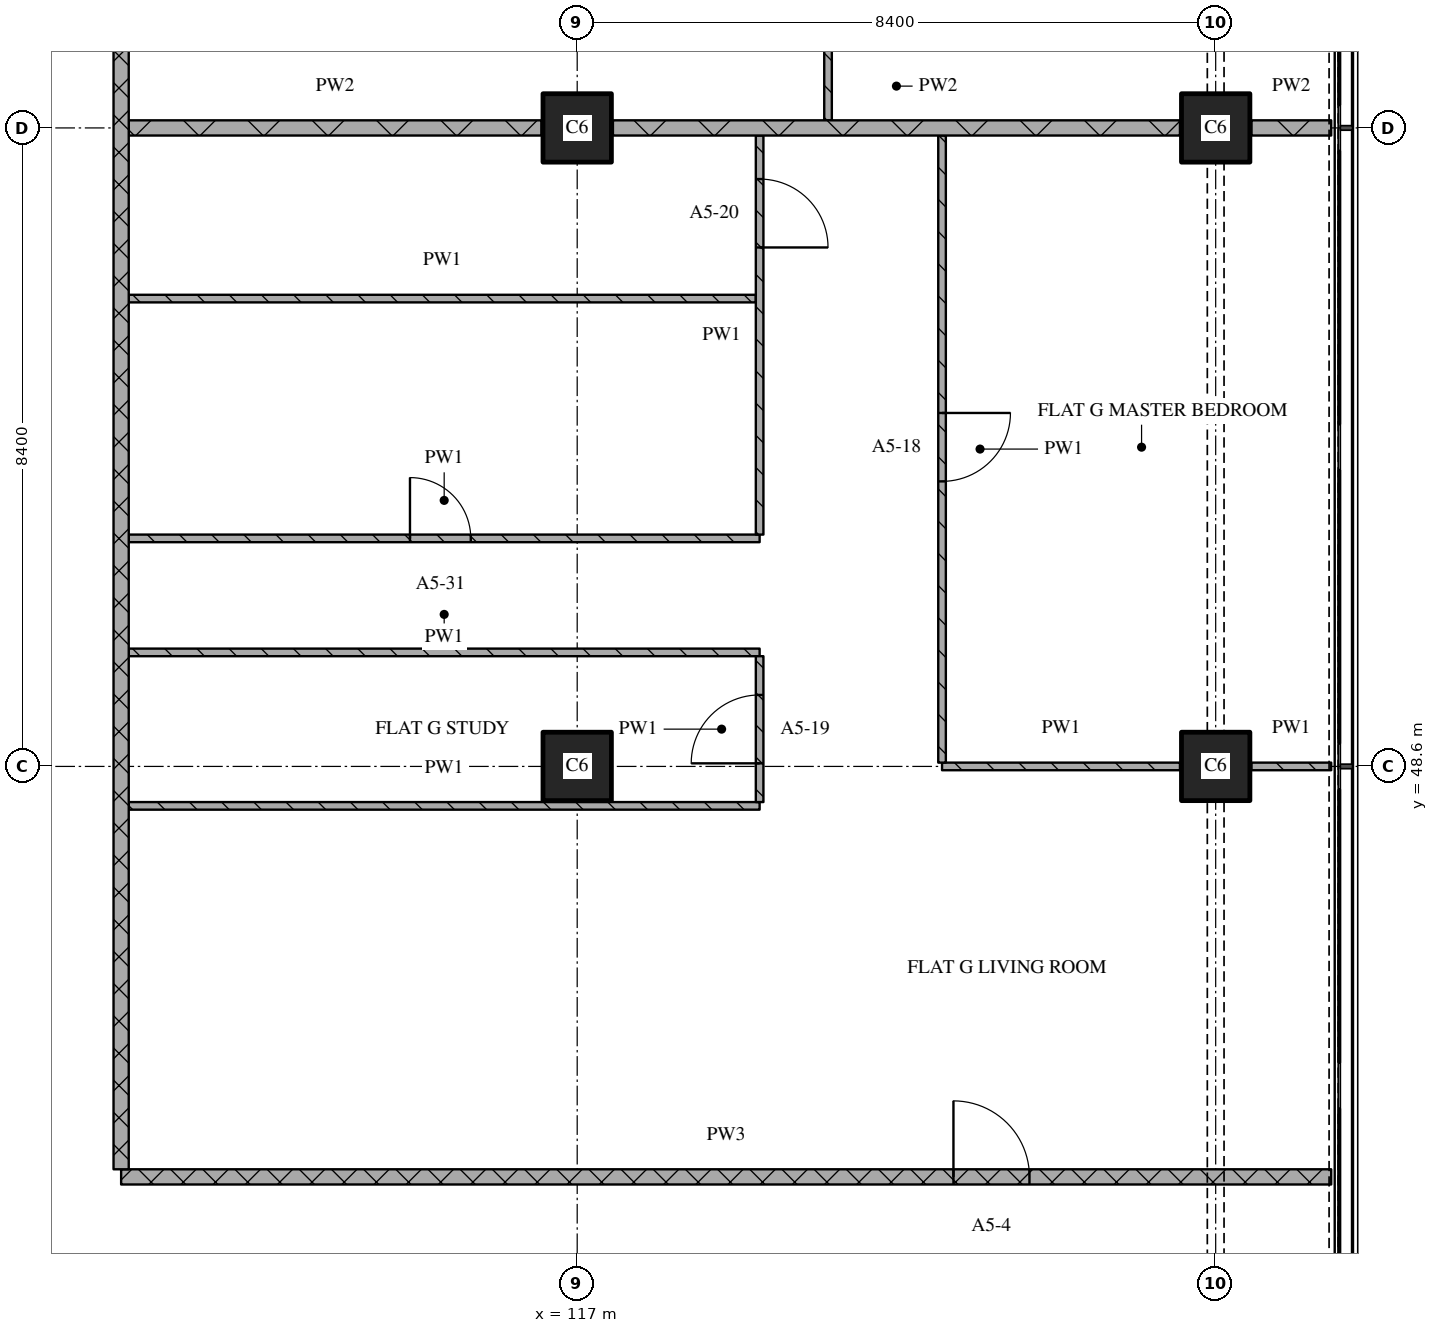
"""IFC4 building model, lengths in metres.
Left out: names, types, materials, properties, quantities, classifications, styles, units other than length and angle.
Written with IfcOpenShell. Run it as: python <this file> out.ifc"""

import sys

from ifc_helpers import new_model, si_unit, direction, frame, frame_2d, origin, origin_2d, place, context, subcontext, project, spatial, rectangle, extrude, element, fill, save


model = new_model("IFC4")
c1 = context("Model", 3, precision=1e-05, world=origin(), true_north=direction((0.0, 1.0)))
c2 = subcontext(c1, "Body", "Model", "MODEL_VIEW")
j1 = project(units=[si_unit("LENGTHUNIT", "METRE"), si_unit("PLANEANGLEUNIT", "RADIAN")], contexts=[c1])
p1 = place(None, origin())
s1 = spatial("IfcSite", under=j1, at=p1, CompositionType="ELEMENT")
p2 = place(p1, origin())
s2 = spatial("IfcBuilding", under=s1, at=p2, CompositionType="ELEMENT")
p3 = place(p2, frame((0.0, 0.0, 80.4)))
s3 = spatial("IfcBuildingStorey", under=s2, at=p3, CompositionType="ELEMENT", Elevation=80.4)
for number, where, z_axis, x_axis in (
    (1, (117.0, 48.6, 0.0), (0.0, 0.0, 1.0), (1.0, 0.0, 0.0)),
    (2, (117.0, 57.0, 0.0), (0.0, 0.0, 1.0), (1.0, 0.0, 0.0)),
    (3, (125.4, 48.6, 0.0), (0.0, 0.0, 1.0), (1.0, 0.0, 0.0)),
    (4, (125.4, 57.0, 0.0), (0.0, 0.0, 1.0), (1.0, 0.0, 0.0)),
):
    element("IfcColumn", number, at=place(p3, frame(where, z_axis=z_axis, x_axis=x_axis)), inside=s3, PredefinedType="COLUMN", context=c2, shape_type="SweptSolid", body=[
        extrude(rectangle(XDim=0.9, YDim=0.9, at=origin_2d()), origin(), (0.0, 0.0, 1.0), 3.6),
    ])
p4 = place(p3, frame((111.0, 43.2, 0.0), z_axis=(0.0, 0.0, 1.0), x_axis=(1.0, 0.0, 0.0)))
e5 = element("IfcWall", 5, at=p4, inside=s3, PredefinedType="PARTITIONING", context=c2, shape_type="SweptSolid", body=[
    extrude(rectangle(XDim=15.92, YDim=0.2, at=frame_2d((7.96, 0.0))), origin(), (0.0, 0.0, 1.0), 3.3),
])
p5 = place(p4, frame((10.95, 0.0, 0.0)))
e6 = element("IfcOpeningElement", 6, at=p5, cuts=e5, PredefinedType="OPENING", context=c2, shape_type="SweptSolid", body=[
    extrude(rectangle(XDim=1.0, YDim=2.1, at=frame_2d((0.5, 1.05))), frame((0.0, 0.11, 0.0), z_axis=(0.0, -1.0, 0.0), x_axis=(1.0, 0.0, 0.0)), (0.0, 0.0, 1.0), 0.22),
])
p6 = place(p3, frame((111.1, 48.081, 0.0), z_axis=(0.0, 0.0, 1.0), x_axis=(1.0, 0.0, 0.0)))
e7 = element("IfcWall", 7, at=p6, inside=s3, PredefinedType="PARTITIONING", context=c2, shape_type="SweptSolid", body=[
    extrude(rectangle(XDim=8.3, YDim=0.1, at=frame_2d((4.15, 0.0))), origin(), (0.0, 0.0, 1.0), 3.3),
])
p7 = place(p3, frame((121.8, 48.6, 0.0), z_axis=(0.0, 0.0, 1.0), x_axis=(1.0, 0.0, 0.0)))
e8 = element("IfcWall", 8, at=p7, inside=s3, PredefinedType="PARTITIONING", context=c2, shape_type="SweptSolid", body=[
    extrude(rectangle(XDim=3.13, YDim=0.1, at=frame_2d((1.565, 0.0))), origin(), (0.0, 0.0, 1.0), 3.3),
])
p8 = place(p3, frame((125.87, 48.6, 0.0), z_axis=(0.0, 0.0, 1.0), x_axis=(1.0, 0.0, 0.0)))
e9 = element("IfcWall", 9, at=p8, inside=s3, PredefinedType="PARTITIONING", context=c2, shape_type="SweptSolid", body=[
    extrude(rectangle(XDim=1.05, YDim=0.1, at=frame_2d((0.525, 0.0))), origin(), (0.0, 0.0, 1.0), 3.3),
])
p9 = place(p3, frame((111.1, 50.1, 0.0), z_axis=(0.0, 0.0, 1.0), x_axis=(1.0, 0.0, 0.0)))
e10 = element("IfcWall", 10, at=p9, inside=s3, PredefinedType="PARTITIONING", context=c2, shape_type="SweptSolid", body=[
    extrude(rectangle(XDim=8.3, YDim=0.1, at=frame_2d((4.15, 0.0))), origin(), (0.0, 0.0, 1.0), 3.3),
])
p10 = place(p3, frame((111.1, 51.6, 0.0), z_axis=(0.0, 0.0, 1.0), x_axis=(1.0, 0.0, 0.0)))
e11 = element("IfcWall", 11, at=p10, inside=s3, PredefinedType="PARTITIONING", context=c2, shape_type="SweptSolid", body=[
    extrude(rectangle(XDim=8.3, YDim=0.1, at=frame_2d((4.15, 0.0))), origin(), (0.0, 0.0, 1.0), 3.3),
])
p11 = place(p10, frame((3.7, 0.0, 0.0)))
e12 = element("IfcOpeningElement", 12, at=p11, cuts=e11, PredefinedType="OPENING", context=c2, shape_type="SweptSolid", body=[
    extrude(rectangle(XDim=0.8, YDim=2.1, at=frame_2d((0.4, 1.05))), frame((0.0, 0.06, 0.0), z_axis=(0.0, -1.0, 0.0), x_axis=(1.0, 0.0, 0.0)), (0.0, 0.0, 1.0), 0.12),
])
p12 = place(p3, frame((111.1, 54.755, 0.0), z_axis=(0.0, 0.0, 1.0), x_axis=(1.0, 0.0, 0.0)))
e13 = element("IfcWall", 13, at=p12, inside=s3, PredefinedType="PARTITIONING", context=c2, shape_type="SweptSolid", body=[
    extrude(rectangle(XDim=8.25, YDim=0.1, at=frame_2d((4.125, 0.0))), origin(), (0.0, 0.0, 1.0), 3.3),
])
p13 = place(p3, frame((111.1, 57.0, 0.0), z_axis=(0.0, 0.0, 1.0), x_axis=(1.0, 0.0, 0.0)))
e14 = element("IfcWall", 14, at=p13, inside=s3, PredefinedType="PARTITIONING", context=c2, shape_type="SweptSolid", body=[
    extrude(rectangle(XDim=5.43, YDim=0.2, at=frame_2d((2.715, 0.0))), origin(), (0.0, 0.0, 1.0), 3.3),
])
p14 = place(p3, frame((117.47, 57.0, 0.0), z_axis=(0.0, 0.0, 1.0), x_axis=(1.0, 0.0, 0.0)))
e15 = element("IfcWall", 15, at=p14, inside=s3, PredefinedType="PARTITIONING", context=c2, shape_type="SweptSolid", body=[
    extrude(rectangle(XDim=7.46, YDim=0.2, at=frame_2d((3.73, 0.0))), origin(), (0.0, 0.0, 1.0), 3.3),
])
p15 = place(p3, frame((125.87, 57.0, 0.0), z_axis=(0.0, 0.0, 1.0), x_axis=(1.0, 0.0, 0.0)))
e16 = element("IfcWall", 16, at=p15, inside=s3, PredefinedType="PARTITIONING", context=c2, shape_type="SweptSolid", body=[
    extrude(rectangle(XDim=1.05, YDim=0.2, at=frame_2d((0.525, 0.0))), origin(), (0.0, 0.0, 1.0), 3.3),
])
p16 = place(p3, frame((111.0, 75.32, 0.0), z_axis=(0.0, 0.0, 1.0), x_axis=(0.0, -1.0, 0.0)))
e17 = element("IfcWall", 17, at=p16, inside=s3, PredefinedType="PARTITIONING", context=c2, shape_type="SweptSolid", body=[
    extrude(rectangle(XDim=32.02, YDim=0.2, at=frame_2d((16.01, 0.0))), origin(), (0.0, 0.0, 1.0), 3.3),
])
p17 = place(p16, frame((11.37, 0.0, 0.0)))
e18 = element("IfcOpeningElement", 18, at=p17, cuts=e17, PredefinedType="OPENING", context=c2, shape_type="SweptSolid", body=[
    extrude(rectangle(XDim=1.0, YDim=2.1, at=frame_2d((0.5, 1.05))), frame((0.0, 0.11, 0.0), z_axis=(0.0, -1.0, 0.0), x_axis=(1.0, 0.0, 0.0)), (0.0, 0.0, 1.0), 0.22),
])
p18 = place(p3, frame((119.4, 48.131, 0.0), z_axis=(0.0, 0.0, 1.0), x_axis=(0.0, 1.0, 0.0)))
e19 = element("IfcWall", 19, at=p18, inside=s3, PredefinedType="PARTITIONING", context=c2, shape_type="SweptSolid", body=[
    extrude(rectangle(XDim=1.919, YDim=0.1, at=frame_2d((0.959, 0.0))), origin(), (0.0, 0.0, 1.0), 3.3),
])
p19 = place(p18, frame((0.51, 0.0, 0.0)))
e20 = element("IfcOpeningElement", 20, at=p19, cuts=e19, PredefinedType="OPENING", context=c2, shape_type="SweptSolid", body=[
    extrude(rectangle(XDim=0.9, YDim=2.1, at=frame_2d((0.45, 1.05))), frame((0.0, 0.06, 0.0), z_axis=(0.0, -1.0, 0.0), x_axis=(1.0, 0.0, 0.0)), (0.0, 0.0, 1.0), 0.12),
])
p20 = place(p3, frame((119.4, 51.65, 0.0), z_axis=(0.0, 0.0, 1.0), x_axis=(0.0, 1.0, 0.0)))
e21 = element("IfcWall", 21, at=p20, inside=s3, PredefinedType="PARTITIONING", context=c2, shape_type="SweptSolid", body=[
    extrude(rectangle(XDim=5.25, YDim=0.1, at=frame_2d((2.625, 0.0))), origin(), (0.0, 0.0, 1.0), 3.3),
])
p21 = place(p20, frame((3.777, 0.0, 0.0)))
e22 = element("IfcOpeningElement", 22, at=p21, cuts=e21, PredefinedType="OPENING", context=c2, shape_type="SweptSolid", body=[
    extrude(rectangle(XDim=0.9, YDim=2.1, at=frame_2d((0.45, 1.05))), frame((0.0, 0.06, 0.0), z_axis=(0.0, -1.0, 0.0), x_axis=(1.0, 0.0, 0.0)), (0.0, 0.0, 1.0), 0.12),
])
p22 = place(p3, frame((120.3, 57.1, 0.0), z_axis=(0.0, 0.0, 1.0), x_axis=(0.0, 1.0, 0.0)))
e23 = element("IfcWall", 23, at=p22, inside=s3, PredefinedType="PARTITIONING", context=c2, shape_type="SweptSolid", body=[
    extrude(rectangle(XDim=5.55, YDim=0.1, at=frame_2d((2.775, 0.0))), origin(), (0.0, 0.0, 1.0), 3.3),
])
p23 = place(p22, frame((0.925, 0.0, 0.0)))
e24 = element("IfcOpeningElement", 24, at=p23, cuts=e23, PredefinedType="OPENING", context=c2, shape_type="SweptSolid", body=[
    extrude(rectangle(XDim=0.8, YDim=2.1, at=frame_2d((0.4, 1.05))), frame((0.0, 0.06, 0.0), z_axis=(0.0, -1.0, 0.0), x_axis=(1.0, 0.0, 0.0)), (0.0, 0.0, 1.0), 0.12),
])
p24 = place(p22, frame((3.775, 0.0, 0.0)))
e25 = element("IfcOpeningElement", 25, at=p24, cuts=e23, PredefinedType="OPENING", context=c2, shape_type="SweptSolid", body=[
    extrude(rectangle(XDim=0.8, YDim=2.1, at=frame_2d((0.4, 1.05))), frame((0.0, 0.06, 0.0), z_axis=(0.0, -1.0, 0.0), x_axis=(1.0, 0.0, 0.0)), (0.0, 0.0, 1.0), 0.12),
])
p25 = place(p3, frame((121.8, 56.9, 0.0), z_axis=(0.0, 0.0, 1.0), x_axis=(0.0, -1.0, 0.0)))
e26 = element("IfcWall", 26, at=p25, inside=s3, PredefinedType="PARTITIONING", context=c2, shape_type="SweptSolid", body=[
    extrude(rectangle(XDim=8.25, YDim=0.1, at=frame_2d((4.125, 0.0))), origin(), (0.0, 0.0, 1.0), 3.3),
])
p26 = place(p25, frame((3.65, 0.0, 0.0)))
e27 = element("IfcOpeningElement", 27, at=p26, cuts=e26, PredefinedType="OPENING", context=c2, shape_type="SweptSolid", body=[
    extrude(rectangle(XDim=0.9, YDim=2.1, at=frame_2d((0.45, 1.05))), frame((0.0, 0.06, 0.0), z_axis=(0.0, -1.0, 0.0), x_axis=(1.0, 0.0, 0.0)), (0.0, 0.0, 1.0), 0.12),
])
p27 = place(p5, origin())
e28 = element("IfcDoor", 28, at=p27, inside=s3, OperationType="SINGLE_SWING_LEFT", PredefinedType="DOOR", context=c2, shape_type="SweptSolid", body=[
    extrude(rectangle(XDim=1.0, YDim=2.1, at=frame_2d((0.5, 1.05))), frame((0.0, 0.025, 0.0), z_axis=(0.0, -1.0, 0.0), x_axis=(1.0, 0.0, 0.0)), (0.0, 0.0, 1.0), 0.05),
])
fill(e6, e28)
p28 = place(p11, origin())
e29 = element("IfcDoor", 29, at=p28, inside=s3, OperationType="SINGLE_SWING_LEFT", PredefinedType="DOOR", context=c2, shape_type="SweptSolid", body=[
    extrude(rectangle(XDim=0.8, YDim=2.1, at=frame_2d((0.4, 1.05))), frame((0.0, 0.025, 0.0), z_axis=(0.0, -1.0, 0.0), x_axis=(1.0, 0.0, 0.0)), (0.0, 0.0, 1.0), 0.05),
])
fill(e12, e29)
p29 = place(p19, origin())
e30 = element("IfcDoor", 30, at=p29, inside=s3, OperationType="SINGLE_SWING_LEFT", PredefinedType="DOOR", context=c2, shape_type="SweptSolid", body=[
    extrude(rectangle(XDim=0.9, YDim=2.1, at=frame_2d((0.45, 1.05))), frame((0.0, 0.025, 0.0), z_axis=(0.0, -1.0, 0.0), x_axis=(1.0, 0.0, 0.0)), (0.0, 0.0, 1.0), 0.05),
])
fill(e20, e30)
p30 = place(p21, origin())
e31 = element("IfcDoor", 31, at=p30, inside=s3, OperationType="SINGLE_SWING_RIGHT", PredefinedType="DOOR", context=c2, shape_type="SweptSolid", body=[
    extrude(rectangle(XDim=0.9, YDim=2.1, at=frame_2d((0.45, 1.05))), frame((0.0, 0.025, 0.0), z_axis=(0.0, -1.0, 0.0), x_axis=(1.0, 0.0, 0.0)), (0.0, 0.0, 1.0), 0.05),
])
fill(e22, e31)
p31 = place(p26, origin())
e32 = element("IfcDoor", 32, at=p31, inside=s3, OperationType="SINGLE_SWING_LEFT", PredefinedType="DOOR", context=c2, shape_type="SweptSolid", body=[
    extrude(rectangle(XDim=0.9, YDim=2.1, at=frame_2d((0.45, 1.05))), frame((0.0, 0.025, 0.0), z_axis=(0.0, -1.0, 0.0), x_axis=(1.0, 0.0, 0.0)), (0.0, 0.0, 1.0), 0.05),
])
fill(e27, e32)
save(model, sys.argv[1])
